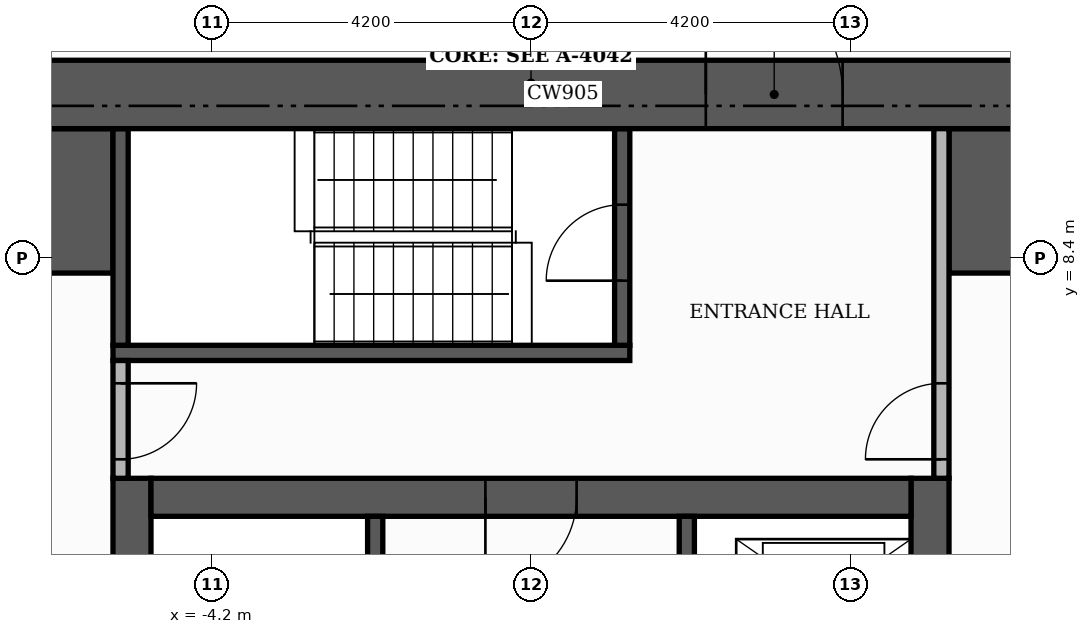
"""IFC4 building model, lengths in metres.
Left out: names, types, materials, properties, quantities, classifications, styles, units other than length and angle.
Written with IfcOpenShell. Run it as: python <this file> out.ifc"""

import sys

from ifc_helpers import new_model, si_unit, direction, frame, frame_2d, origin, place, context, subcontext, project, spatial, rectangle, extrude, element, fill, save


model = new_model("IFC4")
c1 = context("Model", 3, precision=1e-05, world=origin(), true_north=direction((0.0, 1.0)))
c2 = subcontext(c1, "Body", "Model", "MODEL_VIEW")
j1 = project(units=[si_unit("LENGTHUNIT", "METRE"), si_unit("PLANEANGLEUNIT", "RADIAN")], contexts=[c1])
p1 = place(None, origin())
s1 = spatial("IfcSite", under=j1, at=p1, CompositionType="ELEMENT")
p2 = place(p1, origin())
s2 = spatial("IfcBuilding", under=s1, at=p2, CompositionType="ELEMENT")
p3 = place(p2, frame((0.0, 0.0, 260.1)))
s3 = spatial("IfcBuildingStorey", under=s2, at=p3, CompositionType="ELEMENT", Elevation=260.1)
for number, where, z_axis, x_axis in (
    (1, (-5.25, -5.0, 0.0), (0.0, 0.0, 1.0), (0.0, 1.0, 0.0)),
    (2, (5.25, -5.0, 0.0), (0.0, 0.0, 1.0), (0.0, 1.0, 0.0)),
):
    element("IfcWall", number, at=place(p3, frame(where, z_axis=z_axis, x_axis=x_axis)), inside=s3, PredefinedType="SHEAR", context=c2, shape_type="SweptSolid", body=[
        extrude(rectangle(XDim=10.5, YDim=0.5, at=frame_2d((5.25, 0.0))), origin(), (0.0, 0.0, 1.0), 3.48),
    ])
p4 = place(p3, frame((-5.0, 5.25, 0.0), z_axis=(0.0, 0.0, 1.0), x_axis=(1.0, 0.0, 0.0)))
e3 = element("IfcWall", 3, at=p4, inside=s3, PredefinedType="SHEAR", context=c2, shape_type="SweptSolid", body=[
    extrude(rectangle(XDim=10.0, YDim=0.5, at=frame_2d((5.0, 0.0))), origin(), (0.0, 0.0, 1.0), 3.48),
])
p5 = place(p4, frame((4.4, 0.0, 0.0)))
e4 = element("IfcOpeningElement", 4, at=p5, cuts=e3, PredefinedType="OPENING", context=c2, shape_type="SweptSolid", body=[
    extrude(rectangle(XDim=1.2, YDim=2.1, at=frame_2d((0.6, 1.05))), frame((0.0, 0.26, 0.0), z_axis=(0.0, -1.0, 0.0), x_axis=(1.0, 0.0, 0.0)), (0.0, 0.0, 1.0), 0.52),
])
for number, where, z_axis, x_axis in (
    (5, (-10.1, 9.15, 0.0), (0.0, 0.0, 1.0), (1.0, 0.0, 0.0)),
    (6, (5.5, 9.15, 0.0), (0.0, 0.0, 1.0), (1.0, 0.0, 0.0)),
):
    element("IfcWall", number, at=place(p3, frame(where, z_axis=z_axis, x_axis=x_axis)), inside=s3, PredefinedType="SHEAR", context=c2, shape_type="SweptSolid", body=[
        extrude(rectangle(XDim=4.6, YDim=1.9, at=frame_2d((2.3, 0.0))), origin(), (0.0, 0.0, 1.0), 3.48),
    ])
p6 = place(p3, frame((-2.05, -1.4, 0.0), z_axis=(0.0, 0.0, 1.0), x_axis=(0.0, 1.0, 0.0)))
e7 = element("IfcWall", 7, at=p6, inside=s3, PredefinedType="SHEAR", context=c2, shape_type="SweptSolid", body=[
    extrude(rectangle(XDim=6.4, YDim=0.2, at=frame_2d((3.2, 0.0))), origin(), (0.0, 0.0, 1.0), 3.48),
])
p7 = place(p6, frame((0.15, 0.0, 0.0)))
e8 = element("IfcOpeningElement", 8, at=p7, cuts=e7, PredefinedType="OPENING", context=c2, shape_type="SweptSolid", body=[
    extrude(rectangle(XDim=1.0, YDim=2.1, at=frame_2d((0.5, 1.05))), frame((0.0, 0.11, 0.0), z_axis=(0.0, -1.0, 0.0), x_axis=(1.0, 0.0, 0.0)), (0.0, 0.0, 1.0), 0.22),
])
p8 = place(p3, frame((-5.5, 7.15, 0.0), z_axis=(0.0, 0.0, 1.0), x_axis=(1.0, 0.0, 0.0)))
e9 = element("IfcWall", 9, at=p8, inside=s3, PredefinedType="SHEAR", context=c2, shape_type="SweptSolid", body=[
    extrude(rectangle(XDim=6.8, YDim=0.2, at=frame_2d((3.4, 0.0))), origin(), (0.0, 0.0, 1.0), 3.48),
])
p9 = place(p3, frame((-5.4, 7.25, 0.0), z_axis=(0.0, 0.0, 1.0), x_axis=(0.0, 1.0, 0.0)))
e10 = element("IfcWall", 10, at=p9, inside=s3, PredefinedType="SHEAR", context=c2, shape_type="SweptSolid", body=[
    extrude(rectangle(XDim=2.85, YDim=0.2, at=frame_2d((1.425, 0.0))), origin(), (0.0, 0.0, 1.0), 3.48),
])
p10 = place(p3, frame((1.2, 7.25, 0.0), z_axis=(0.0, 0.0, 1.0), x_axis=(0.0, 1.0, 0.0)))
e11 = element("IfcWall", 11, at=p10, inside=s3, PredefinedType="SHEAR", context=c2, shape_type="SweptSolid", body=[
    extrude(rectangle(XDim=2.85, YDim=0.2, at=frame_2d((1.425, 0.0))), origin(), (0.0, 0.0, 1.0), 3.48),
])
p11 = place(p10, frame((0.85, 0.0, 0.0)))
e12 = element("IfcOpeningElement", 12, at=p11, cuts=e11, PredefinedType="OPENING", context=c2, shape_type="SweptSolid", body=[
    extrude(rectangle(XDim=1.0, YDim=2.1, at=frame_2d((0.5, 1.05))), frame((0.0, 0.11, 0.0), z_axis=(0.0, -1.0, 0.0), x_axis=(1.0, 0.0, 0.0)), (0.0, 0.0, 1.0), 0.22),
])
p12 = place(p3, frame((2.05, 1.6, 0.0), z_axis=(0.0, 0.0, 1.0), x_axis=(0.0, 1.0, 0.0)))
e13 = element("IfcWall", 13, at=p12, inside=s3, PredefinedType="SHEAR", context=c2, shape_type="SweptSolid", body=[
    extrude(rectangle(XDim=3.4, YDim=0.2, at=frame_2d((1.7, 0.0))), origin(), (0.0, 0.0, 1.0), 3.48),
])
p13 = place(p12, frame((1.75, 0.0, 0.0)))
e14 = element("IfcOpeningElement", 14, at=p13, cuts=e13, PredefinedType="OPENING", context=c2, shape_type="SweptSolid", body=[
    extrude(rectangle(XDim=1.1, YDim=2.1, at=frame_2d((0.55, 1.05))), frame((0.0, 0.11, 0.0), z_axis=(0.0, -1.0, 0.0), x_axis=(1.0, 0.0, 0.0)), (0.0, 0.0, 1.0), 0.22),
])
p14 = place(p12, frame((0.15, 0.0, 0.0)))
e15 = element("IfcOpeningElement", 15, at=p14, cuts=e13, PredefinedType="OPENING", context=c2, shape_type="SweptSolid", body=[
    extrude(rectangle(XDim=0.8, YDim=2.1, at=frame_2d((0.4, 1.05))), frame((0.0, 0.11, 0.0), z_axis=(0.0, -1.0, 0.0), x_axis=(1.0, 0.0, 0.0)), (0.0, 0.0, 1.0), 0.22),
])
p15 = place(p3, frame((-11.0, 10.55, 0.0), z_axis=(0.0, 0.0, 1.0), x_axis=(1.0, 0.0, 0.0)))
e16 = element("IfcWall", 16, at=p15, inside=s3, PredefinedType="SHEAR", context=c2, shape_type="SweptSolid", body=[
    extrude(rectangle(XDim=22.0, YDim=0.9, at=frame_2d((11.0, 0.0))), origin(), (0.0, 0.0, 1.0), 3.48),
])
p16 = place(p15, frame((13.3, 0.0, 0.0)))
e17 = element("IfcOpeningElement", 17, at=p16, cuts=e16, PredefinedType="OPENING", context=c2, shape_type="SweptSolid", body=[
    extrude(rectangle(XDim=1.8, YDim=2.2, at=frame_2d((0.9, 1.1))), frame((0.0, 0.46, 0.0), z_axis=(0.0, -1.0, 0.0), x_axis=(1.0, 0.0, 0.0)), (0.0, 0.0, 1.0), 0.92),
])
p17 = place(p3, frame((-5.4, 5.5, 0.0), z_axis=(0.0, 0.0, 1.0), x_axis=(0.0, 1.0, 0.0)))
e18 = element("IfcWall", 18, at=p17, inside=s3, PredefinedType="PARTITIONING", context=c2, shape_type="SweptSolid", body=[
    extrude(rectangle(XDim=1.55, YDim=0.2, at=frame_2d((0.775, 0.0))), origin(), (0.0, 0.0, 1.0), 3.48),
])
p18 = place(p17, frame((0.25, 0.0, 0.0)))
e19 = element("IfcOpeningElement", 19, at=p18, cuts=e18, PredefinedType="OPENING", context=c2, shape_type="SweptSolid", body=[
    extrude(rectangle(XDim=1.0, YDim=2.1, at=frame_2d((0.5, 1.05))), frame((0.0, 0.11, 0.0), z_axis=(0.0, -1.0, 0.0), x_axis=(1.0, 0.0, 0.0)), (0.0, 0.0, 1.0), 0.22),
])
p19 = place(p3, frame((5.4, 5.5, 0.0), z_axis=(0.0, 0.0, 1.0), x_axis=(0.0, 1.0, 0.0)))
e20 = element("IfcWall", 20, at=p19, inside=s3, PredefinedType="PARTITIONING", context=c2, shape_type="SweptSolid", body=[
    extrude(rectangle(XDim=4.6, YDim=0.2, at=frame_2d((2.3, 0.0))), origin(), (0.0, 0.0, 1.0), 3.48),
])
p20 = place(p19, frame((0.25, 0.0, 0.0)))
e21 = element("IfcOpeningElement", 21, at=p20, cuts=e20, PredefinedType="OPENING", context=c2, shape_type="SweptSolid", body=[
    extrude(rectangle(XDim=1.0, YDim=2.1, at=frame_2d((0.5, 1.05))), frame((0.0, 0.11, 0.0), z_axis=(0.0, -1.0, 0.0), x_axis=(1.0, 0.0, 0.0)), (0.0, 0.0, 1.0), 0.22),
])
p21 = place(p5, frame((1.2, 0.0, 0.0), z_axis=(0.0, 0.0, 1.0), x_axis=(-1.0, 0.0, 0.0)))
e22 = element("IfcDoor", 22, at=p21, inside=s3, OperationType="SINGLE_SWING_LEFT", PredefinedType="DOOR", context=c2, shape_type="SweptSolid", body=[
    extrude(rectangle(XDim=1.2, YDim=2.1, at=frame_2d((0.6, 1.05))), frame((0.0, 0.025, 0.0), z_axis=(0.0, -1.0, 0.0), x_axis=(1.0, 0.0, 0.0)), (0.0, 0.0, 1.0), 0.05),
])
fill(e4, e22)
p22 = place(p11, origin())
e23 = element("IfcDoor", 23, at=p22, inside=s3, OperationType="SINGLE_SWING_LEFT", PredefinedType="DOOR", context=c2, shape_type="SweptSolid", body=[
    extrude(rectangle(XDim=1.0, YDim=2.1, at=frame_2d((0.5, 1.05))), frame((0.0, 0.025, 0.0), z_axis=(0.0, -1.0, 0.0), x_axis=(1.0, 0.0, 0.0)), (0.0, 0.0, 1.0), 0.05),
])
fill(e12, e23)
p23 = place(p18, frame((1.0, 0.0, 0.0), z_axis=(0.0, 0.0, 1.0), x_axis=(-1.0, 0.0, 0.0)))
e24 = element("IfcDoor", 24, at=p23, inside=s3, OperationType="SINGLE_SWING_RIGHT", PredefinedType="DOOR", context=c2, shape_type="SweptSolid", body=[
    extrude(rectangle(XDim=1.0, YDim=2.1, at=frame_2d((0.5, 1.05))), frame((0.0, 0.025, 0.0), z_axis=(0.0, -1.0, 0.0), x_axis=(1.0, 0.0, 0.0)), (0.0, 0.0, 1.0), 0.05),
])
fill(e19, e24)
p24 = place(p20, origin())
e25 = element("IfcDoor", 25, at=p24, inside=s3, OperationType="SINGLE_SWING_LEFT", PredefinedType="DOOR", context=c2, shape_type="SweptSolid", body=[
    extrude(rectangle(XDim=1.0, YDim=2.1, at=frame_2d((0.5, 1.05))), frame((0.0, 0.025, 0.0), z_axis=(0.0, -1.0, 0.0), x_axis=(1.0, 0.0, 0.0)), (0.0, 0.0, 1.0), 0.05),
])
fill(e21, e25)
p25 = place(p16, origin())
e26 = element("IfcDoor", 26, at=p25, inside=s3, OperationType="DOUBLE_DOOR_SINGLE_SWING", PredefinedType="DOOR", context=c2, shape_type="SweptSolid", body=[
    extrude(rectangle(XDim=1.8, YDim=2.2, at=frame_2d((0.9, 1.1))), frame((0.0, 0.025, 0.0), z_axis=(0.0, -1.0, 0.0), x_axis=(1.0, 0.0, 0.0)), (0.0, 0.0, 1.0), 0.05),
])
fill(e17, e26)
save(model, sys.argv[1])
